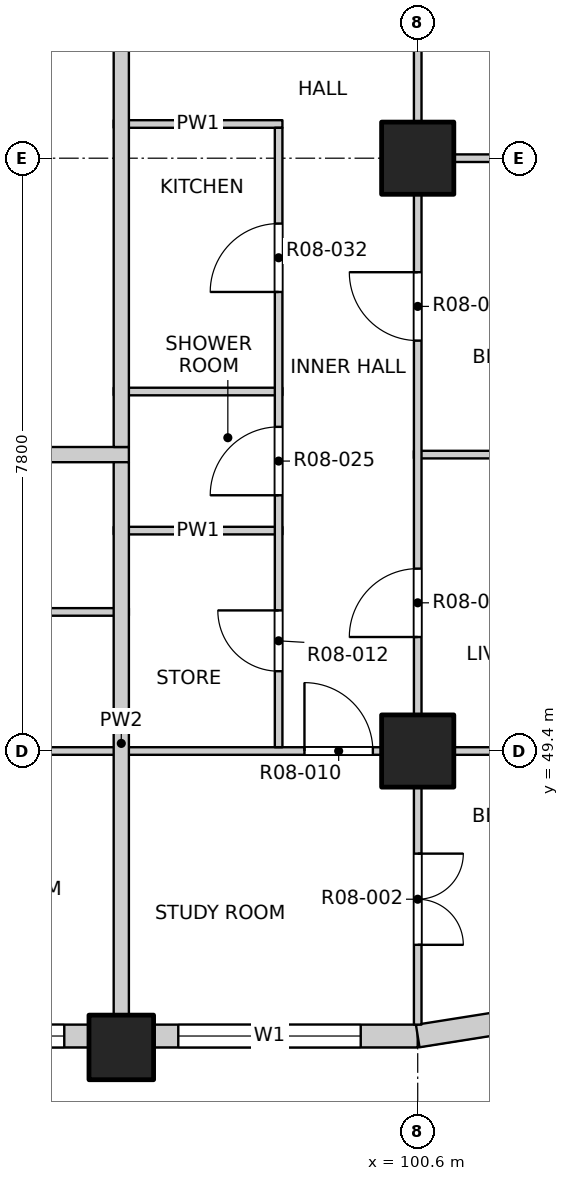
"""IFC4 building model, lengths in metres.
Left out: names, types, materials, properties, quantities, classifications, styles, units other than length and angle.
Written with IfcOpenShell. Run it as: python <this file> out.ifc"""

import sys

from ifc_helpers import new_model, si_unit, direction, frame, frame_2d, origin, origin_2d, place, context, subcontext, project, spatial, rectangle, extrude, element, fill, save


model = new_model("IFC4")
c1 = context("Model", 3, precision=1e-05, world=origin(), true_north=direction((0.0, 1.0)))
c2 = subcontext(c1, "Body", "Model", "MODEL_VIEW")
j1 = project(units=[si_unit("LENGTHUNIT", "METRE"), si_unit("PLANEANGLEUNIT", "RADIAN")], contexts=[c1])
p1 = place(None, origin())
s1 = spatial("IfcSite", under=j1, at=p1, CompositionType="ELEMENT")
p2 = place(p1, origin())
s2 = spatial("IfcBuilding", under=s1, at=p2, CompositionType="ELEMENT")
p3 = place(p2, frame((0.0, 0.0, 103.3)))
s3 = spatial("IfcBuildingStorey", under=s2, at=p3, CompositionType="ELEMENT", Elevation=103.3)
p4 = place(p3, frame((96.7, 45.5, -0.25), z_axis=(0.0, 0.0, 1.0), x_axis=(1.0, 0.0, 0.0)))
e1 = element("IfcColumn", 1, at=p4, inside=s3, PredefinedType="COLUMN", context=c2, shape_type="SweptSolid", body=[
    extrude(rectangle(XDim=0.85, YDim=0.85, at=origin_2d()), origin(), (0.0, 0.0, 1.0), 3.4),
])
for number, where, z_axis, x_axis in (
    (2, (100.6, 49.4, -0.25), (0.0, 0.0, 1.0), (1.0, 0.0, 0.0)),
    (3, (100.6, 57.2, -0.25), (0.0, 0.0, 1.0), (1.0, 0.0, 0.0)),
):
    element("IfcColumn", number, at=place(p3, frame(where, z_axis=z_axis, x_axis=x_axis)), inside=s3, PredefinedType="COLUMN", context=c2, shape_type="SweptSolid", body=[
        extrude(rectangle(XDim=0.95, YDim=0.95, at=origin_2d()), origin(), (0.0, 0.0, 1.0), 3.4),
    ])
p5 = place(p3, frame((89.325, 45.65, 0.0), z_axis=(0.0, 0.0, 1.0), x_axis=(1.0, 0.0, 0.0)))
e4 = element("IfcWall", 4, at=p5, inside=s3, PredefinedType="SOLIDWALL", context=c2, shape_type="SweptSolid", body=[
    extrude(rectangle(XDim=6.95, YDim=0.3, at=frame_2d((3.475, 0.0))), origin(), (0.0, 0.0, 1.0), 2.7),
])
p6 = place(p5, frame((0.325, 0.0, 0.9)))
e5 = element("IfcOpeningElement", 5, at=p6, cuts=e4, PredefinedType="OPENING", context=c2, shape_type="SweptSolid", body=[
    extrude(rectangle(XDim=2.4, YDim=1.8, at=frame_2d((1.2, 0.9))), frame((0.0, 0.16, 0.0), z_axis=(0.0, -1.0, 0.0), x_axis=(1.0, 0.0, 0.0)), (0.0, 0.0, 1.0), 0.32),
])
p7 = place(p5, frame((4.225, 0.0, 0.9)))
e6 = element("IfcOpeningElement", 6, at=p7, cuts=e4, PredefinedType="OPENING", context=c2, shape_type="SweptSolid", body=[
    extrude(rectangle(XDim=2.4, YDim=1.8, at=frame_2d((1.2, 0.9))), frame((0.0, 0.16, 0.0), z_axis=(0.0, -1.0, 0.0), x_axis=(1.0, 0.0, 0.0)), (0.0, 0.0, 1.0), 0.32),
])
p8 = place(p3, frame((97.125, 45.65, 0.0), z_axis=(0.0, 0.0, 1.0), x_axis=(1.0, 0.0, 0.0)))
e7 = element("IfcWall", 7, at=p8, inside=s3, PredefinedType="SOLIDWALL", context=c2, shape_type="SweptSolid", body=[
    extrude(rectangle(XDim=3.475, YDim=0.3, at=frame_2d((1.738, 0.0))), origin(), (0.0, 0.0, 1.0), 2.7),
])
p9 = place(p8, frame((0.325, 0.0, 0.9)))
e8 = element("IfcOpeningElement", 8, at=p9, cuts=e7, PredefinedType="OPENING", context=c2, shape_type="SweptSolid", body=[
    extrude(rectangle(XDim=2.4, YDim=1.8, at=frame_2d((1.2, 0.9))), frame((0.0, 0.16, 0.0), z_axis=(0.0, -1.0, 0.0), x_axis=(1.0, 0.0, 0.0)), (0.0, 0.0, 1.0), 0.32),
])
p10 = place(p3, frame((100.6, 45.65, 0.0), z_axis=(0.0, 0.0, 1.0), x_axis=(0.987678452879, 0.156496880861, 0.0)))
e9 = element("IfcWall", 9, at=p10, inside=s3, PredefinedType="SOLIDWALL", context=c2, shape_type="SweptSolid", body=[
    extrude(rectangle(XDim=1.173, YDim=0.3, at=frame_2d((0.586, 0.0))), origin(), (0.0, 0.0, 1.0), 2.7),
])
p11 = place(p3, frame((65.8, 49.4, 0.0), z_axis=(0.0, 0.0, 1.0), x_axis=(1.0, 0.0, 0.0)))
e10 = element("IfcWall", 10, at=p11, inside=s3, PredefinedType="PARTITIONING", context=c2, shape_type="SweptSolid", body=[
    extrude(rectangle(XDim=38.4, YDim=0.1, at=frame_2d((19.2, 0.0))), origin(), (0.0, 0.0, 1.0), 3.15),
])
p12 = place(p11, frame((4.19, 0.0, 0.0)))
e11 = element("IfcOpeningElement", 11, at=p12, cuts=e10, PredefinedType="OPENING", context=c2, shape_type="SweptSolid", body=[
    extrude(rectangle(XDim=0.9, YDim=2.1, at=frame_2d((0.45, 1.05))), frame((0.0, 0.06, 0.0), z_axis=(0.0, -1.0, 0.0), x_axis=(1.0, 0.0, 0.0)), (0.0, 0.0, 1.0), 0.12),
])
p13 = place(p11, frame((9.0, 0.0, 0.0)))
e12 = element("IfcOpeningElement", 12, at=p13, cuts=e10, PredefinedType="OPENING", context=c2, shape_type="SweptSolid", body=[
    extrude(rectangle(XDim=0.9, YDim=2.1, at=frame_2d((0.45, 1.05))), frame((0.0, 0.06, 0.0), z_axis=(0.0, -1.0, 0.0), x_axis=(1.0, 0.0, 0.0)), (0.0, 0.0, 1.0), 0.12),
])
p14 = place(p11, frame((12.9, 0.0, 0.0)))
e13 = element("IfcOpeningElement", 13, at=p14, cuts=e10, PredefinedType="OPENING", context=c2, shape_type="SweptSolid", body=[
    extrude(rectangle(XDim=0.9, YDim=2.1, at=frame_2d((0.45, 1.05))), frame((0.0, 0.06, 0.0), z_axis=(0.0, -1.0, 0.0), x_axis=(1.0, 0.0, 0.0)), (0.0, 0.0, 1.0), 0.12),
])
p15 = place(p11, frame((16.8, 0.0, 0.0)))
e14 = element("IfcOpeningElement", 14, at=p15, cuts=e10, PredefinedType="OPENING", context=c2, shape_type="SweptSolid", body=[
    extrude(rectangle(XDim=0.9, YDim=2.1, at=frame_2d((0.45, 1.05))), frame((0.0, 0.06, 0.0), z_axis=(0.0, -1.0, 0.0), x_axis=(1.0, 0.0, 0.0)), (0.0, 0.0, 1.0), 0.12),
])
p16 = place(p11, frame((20.7, 0.0, 0.0)))
e15 = element("IfcOpeningElement", 15, at=p16, cuts=e10, PredefinedType="OPENING", context=c2, shape_type="SweptSolid", body=[
    extrude(rectangle(XDim=0.9, YDim=2.1, at=frame_2d((0.45, 1.05))), frame((0.0, 0.06, 0.0), z_axis=(0.0, -1.0, 0.0), x_axis=(1.0, 0.0, 0.0)), (0.0, 0.0, 1.0), 0.12),
])
p17 = place(p11, frame((24.6, 0.0, 0.0)))
e16 = element("IfcOpeningElement", 16, at=p17, cuts=e10, PredefinedType="OPENING", context=c2, shape_type="SweptSolid", body=[
    extrude(rectangle(XDim=0.9, YDim=2.1, at=frame_2d((0.45, 1.05))), frame((0.0, 0.06, 0.0), z_axis=(0.0, -1.0, 0.0), x_axis=(1.0, 0.0, 0.0)), (0.0, 0.0, 1.0), 0.12),
])
p18 = place(p11, frame((28.5, 0.0, 0.0)))
e17 = element("IfcOpeningElement", 17, at=p18, cuts=e10, PredefinedType="OPENING", context=c2, shape_type="SweptSolid", body=[
    extrude(rectangle(XDim=0.9, YDim=2.1, at=frame_2d((0.45, 1.05))), frame((0.0, 0.06, 0.0), z_axis=(0.0, -1.0, 0.0), x_axis=(1.0, 0.0, 0.0)), (0.0, 0.0, 1.0), 0.12),
])
p19 = place(p11, frame((33.31, 0.0, 0.0)))
e18 = element("IfcOpeningElement", 18, at=p19, cuts=e10, PredefinedType="OPENING", context=c2, shape_type="SweptSolid", body=[
    extrude(rectangle(XDim=0.9, YDim=2.1, at=frame_2d((0.45, 1.05))), frame((0.0, 0.06, 0.0), z_axis=(0.0, -1.0, 0.0), x_axis=(1.0, 0.0, 0.0)), (0.0, 0.0, 1.0), 0.12),
])
p20 = place(p3, frame((91.05, 51.23, 0.0), z_axis=(0.0, 0.0, 1.0), x_axis=(1.0, 0.0, 0.0)))
e19 = element("IfcWall", 19, at=p20, inside=s3, PredefinedType="PARTITIONING", context=c2, shape_type="SweptSolid", body=[
    extrude(rectangle(XDim=5.75, YDim=0.1, at=frame_2d((2.875, 0.0))), origin(), (0.0, 0.0, 1.0), 3.15),
])
p21 = place(p20, frame((0.865, 0.0, 0.0)))
e20 = element("IfcOpeningElement", 20, at=p21, cuts=e19, PredefinedType="OPENING", context=c2, shape_type="SweptSolid", body=[
    extrude(rectangle(XDim=0.9, YDim=2.1, at=frame_2d((0.45, 1.05))), frame((0.0, 0.06, 0.0), z_axis=(0.0, -1.0, 0.0), x_axis=(1.0, 0.0, 0.0)), (0.0, 0.0, 1.0), 0.12),
])
p22 = place(p20, frame((3.665, 0.0, 0.0)))
e21 = element("IfcOpeningElement", 21, at=p22, cuts=e19, PredefinedType="OPENING", context=c2, shape_type="SweptSolid", body=[
    extrude(rectangle(XDim=0.9, YDim=2.1, at=frame_2d((0.45, 1.05))), frame((0.0, 0.06, 0.0), z_axis=(0.0, -1.0, 0.0), x_axis=(1.0, 0.0, 0.0)), (0.0, 0.0, 1.0), 0.12),
])
p23 = place(p3, frame((96.6, 52.3, 0.0), z_axis=(0.0, 0.0, 1.0), x_axis=(1.0, 0.0, 0.0)))
e22 = element("IfcWall", 22, at=p23, inside=s3, PredefinedType="PARTITIONING", context=c2, shape_type="SweptSolid", body=[
    extrude(rectangle(XDim=2.22, YDim=0.1, at=frame_2d((1.11, 0.0))), origin(), (0.0, 0.0, 1.0), 3.15),
])
p24 = place(p3, frame((73.2, 53.3, 0.0), z_axis=(0.0, 0.0, 1.0), x_axis=(1.0, 0.0, 0.0)))
e23 = element("IfcWall", 23, at=p24, inside=s3, PredefinedType="PARTITIONING", context=c2, shape_type="SweptSolid", body=[
    extrude(rectangle(XDim=23.6, YDim=0.2, at=frame_2d((11.8, 0.0))), origin(), (0.0, 0.0, 1.0), 3.15),
])
p25 = place(p24, frame((5.975, 0.0, 0.0)))
e24 = element("IfcOpeningElement", 24, at=p25, cuts=e23, PredefinedType="OPENING", context=c2, shape_type="SweptSolid", body=[
    extrude(rectangle(XDim=1.0, YDim=2.1, at=frame_2d((0.5, 1.05))), frame((0.0, 0.11, 0.0), z_axis=(0.0, -1.0, 0.0), x_axis=(1.0, 0.0, 0.0)), (0.0, 0.0, 1.0), 0.22),
])
p26 = place(p24, frame((18.075, 0.0, 0.0)))
e25 = element("IfcOpeningElement", 25, at=p26, cuts=e23, PredefinedType="OPENING", context=c2, shape_type="SweptSolid", body=[
    extrude(rectangle(XDim=1.0, YDim=2.1, at=frame_2d((0.5, 1.05))), frame((0.0, 0.11, 0.0), z_axis=(0.0, -1.0, 0.0), x_axis=(1.0, 0.0, 0.0)), (0.0, 0.0, 1.0), 0.22),
])
p27 = place(p3, frame((100.55, 53.3, 0.0), z_axis=(0.0, 0.0, 1.0), x_axis=(1.0, 0.0, 0.0)))
e26 = element("IfcWall", 26, at=p27, inside=s3, PredefinedType="PARTITIONING", context=c2, shape_type="SweptSolid", body=[
    extrude(rectangle(XDim=3.65, YDim=0.1, at=frame_2d((1.825, 0.0))), origin(), (0.0, 0.0, 1.0), 3.15),
])
p28 = place(p3, frame((96.6, 54.13, 0.0), z_axis=(0.0, 0.0, 1.0), x_axis=(1.0, 0.0, 0.0)))
e27 = element("IfcWall", 27, at=p28, inside=s3, PredefinedType="PARTITIONING", context=c2, shape_type="SweptSolid", body=[
    extrude(rectangle(XDim=2.22, YDim=0.1, at=frame_2d((1.11, 0.0))), origin(), (0.0, 0.0, 1.0), 3.15),
])
p29 = place(p3, frame((100.55, 57.2, 0.0), z_axis=(0.0, 0.0, 1.0), x_axis=(1.0, 0.0, 0.0)))
e28 = element("IfcWall", 28, at=p29, inside=s3, PredefinedType="PARTITIONING", context=c2, shape_type="SweptSolid", body=[
    extrude(rectangle(XDim=3.65, YDim=0.1, at=frame_2d((1.825, 0.0))), origin(), (0.0, 0.0, 1.0), 3.15),
])
p30 = place(p3, frame((96.6, 57.65, 0.0), z_axis=(0.0, 0.0, 1.0), x_axis=(1.0, 0.0, 0.0)))
e29 = element("IfcWall", 29, at=p30, inside=s3, PredefinedType="PARTITIONING", context=c2, shape_type="SweptSolid", body=[
    extrude(rectangle(XDim=2.22, YDim=0.1, at=frame_2d((1.11, 0.0))), origin(), (0.0, 0.0, 1.0), 3.15),
])
p31 = place(p3, frame((96.7, 45.8, 0.0), z_axis=(0.0, 0.0, 1.0), x_axis=(0.0, 1.0, 0.0)))
e30 = element("IfcWall", 30, at=p31, inside=s3, PredefinedType="PARTITIONING", context=c2, shape_type="SweptSolid", body=[
    extrude(rectangle(XDim=7.4, YDim=0.2, at=frame_2d((3.7, 0.0))), origin(), (0.0, 0.0, 1.0), 3.15),
])
p32 = place(p3, frame((96.7, 53.4, 0.0), z_axis=(0.0, 0.0, 1.0), x_axis=(0.0, 1.0, 0.0)))
e31 = element("IfcWall", 31, at=p32, inside=s3, PredefinedType="PARTITIONING", context=c2, shape_type="SweptSolid", body=[
    extrude(rectangle(XDim=30.8, YDim=0.2, at=frame_2d((15.4, 0.0))), origin(), (0.0, 0.0, 1.0), 3.15),
])
p33 = place(p32, frame((5.525, 0.0, 0.0)))
e32 = element("IfcOpeningElement", 32, at=p33, cuts=e31, PredefinedType="OPENING", context=c2, shape_type="SweptSolid", body=[
    extrude(rectangle(XDim=1.0, YDim=2.1, at=frame_2d((0.5, 1.05))), frame((0.0, 0.11, 0.0), z_axis=(0.0, -1.0, 0.0), x_axis=(1.0, 0.0, 0.0)), (0.0, 0.0, 1.0), 0.22),
])
p34 = place(p32, frame((13.775, 0.0, 0.0)))
e33 = element("IfcOpeningElement", 33, at=p34, cuts=e31, PredefinedType="OPENING", context=c2, shape_type="SweptSolid", body=[
    extrude(rectangle(XDim=1.0, YDim=2.1, at=frame_2d((0.5, 1.05))), frame((0.0, 0.11, 0.0), z_axis=(0.0, -1.0, 0.0), x_axis=(1.0, 0.0, 0.0)), (0.0, 0.0, 1.0), 0.22),
])
p35 = place(p32, frame((22.125, 0.0, 0.0)))
e34 = element("IfcOpeningElement", 34, at=p35, cuts=e31, PredefinedType="OPENING", context=c2, shape_type="SweptSolid", body=[
    extrude(rectangle(XDim=1.0, YDim=2.1, at=frame_2d((0.5, 1.05))), frame((0.0, 0.11, 0.0), z_axis=(0.0, -1.0, 0.0), x_axis=(1.0, 0.0, 0.0)), (0.0, 0.0, 1.0), 0.22),
])
p36 = place(p3, frame((98.77, 49.45, 0.0), z_axis=(0.0, 0.0, 1.0), x_axis=(0.0, 1.0, 0.0)))
e35 = element("IfcWall", 35, at=p36, inside=s3, PredefinedType="PARTITIONING", context=c2, shape_type="SweptSolid", body=[
    extrude(rectangle(XDim=8.15, YDim=0.1, at=frame_2d((4.075, 0.0))), origin(), (0.0, 0.0, 1.0), 3.15),
])
p37 = place(p36, frame((1.0, 0.0, 0.0)))
e36 = element("IfcOpeningElement", 36, at=p37, cuts=e35, PredefinedType="OPENING", context=c2, shape_type="SweptSolid", body=[
    extrude(rectangle(XDim=0.8, YDim=2.1, at=frame_2d((0.4, 1.05))), frame((0.0, 0.06, 0.0), z_axis=(0.0, -1.0, 0.0), x_axis=(1.0, 0.0, 0.0)), (0.0, 0.0, 1.0), 0.12),
])
p38 = place(p36, frame((3.315, 0.0, 0.0)))
e37 = element("IfcOpeningElement", 37, at=p38, cuts=e35, PredefinedType="OPENING", context=c2, shape_type="SweptSolid", body=[
    extrude(rectangle(XDim=0.9, YDim=2.1, at=frame_2d((0.45, 1.05))), frame((0.0, 0.06, 0.0), z_axis=(0.0, -1.0, 0.0), x_axis=(1.0, 0.0, 0.0)), (0.0, 0.0, 1.0), 0.12),
])
p39 = place(p36, frame((5.99, 0.0, 0.0)))
e38 = element("IfcOpeningElement", 38, at=p39, cuts=e35, PredefinedType="OPENING", context=c2, shape_type="SweptSolid", body=[
    extrude(rectangle(XDim=0.9, YDim=2.1, at=frame_2d((0.45, 1.05))), frame((0.0, 0.06, 0.0), z_axis=(0.0, -1.0, 0.0), x_axis=(1.0, 0.0, 0.0)), (0.0, 0.0, 1.0), 0.12),
])
p40 = place(p3, frame((100.6, 45.8, 0.0), z_axis=(0.0, 0.0, 1.0), x_axis=(0.0, 1.0, 0.0)))
e39 = element("IfcWall", 39, at=p40, inside=s3, PredefinedType="PARTITIONING", context=c2, shape_type="SweptSolid", body=[
    extrude(rectangle(XDim=38.4, YDim=0.1, at=frame_2d((19.2, 0.0))), origin(), (0.0, 0.0, 1.0), 3.15),
])
p41 = place(p40, frame((1.05, 0.0, 0.0)))
e40 = element("IfcOpeningElement", 40, at=p41, cuts=e39, PredefinedType="OPENING", context=c2, shape_type="SweptSolid", body=[
    extrude(rectangle(XDim=1.2, YDim=2.1, at=frame_2d((0.6, 1.05))), frame((0.0, 0.06, 0.0), z_axis=(0.0, -1.0, 0.0), x_axis=(1.0, 0.0, 0.0)), (0.0, 0.0, 1.0), 0.12),
])
p42 = place(p40, frame((5.1, 0.0, 0.0)))
e41 = element("IfcOpeningElement", 41, at=p42, cuts=e39, PredefinedType="OPENING", context=c2, shape_type="SweptSolid", body=[
    extrude(rectangle(XDim=0.9, YDim=2.1, at=frame_2d((0.45, 1.05))), frame((0.0, 0.06, 0.0), z_axis=(0.0, -1.0, 0.0), x_axis=(1.0, 0.0, 0.0)), (0.0, 0.0, 1.0), 0.12),
])
p43 = place(p40, frame((9.0, 0.0, 0.0)))
e42 = element("IfcOpeningElement", 42, at=p43, cuts=e39, PredefinedType="OPENING", context=c2, shape_type="SweptSolid", body=[
    extrude(rectangle(XDim=0.9, YDim=2.1, at=frame_2d((0.45, 1.05))), frame((0.0, 0.06, 0.0), z_axis=(0.0, -1.0, 0.0), x_axis=(1.0, 0.0, 0.0)), (0.0, 0.0, 1.0), 0.12),
])
p44 = place(p40, frame((12.9, 0.0, 0.0)))
e43 = element("IfcOpeningElement", 43, at=p44, cuts=e39, PredefinedType="OPENING", context=c2, shape_type="SweptSolid", body=[
    extrude(rectangle(XDim=0.9, YDim=2.1, at=frame_2d((0.45, 1.05))), frame((0.0, 0.06, 0.0), z_axis=(0.0, -1.0, 0.0), x_axis=(1.0, 0.0, 0.0)), (0.0, 0.0, 1.0), 0.12),
])
p45 = place(p40, frame((16.8, 0.0, 0.0)))
e44 = element("IfcOpeningElement", 44, at=p45, cuts=e39, PredefinedType="OPENING", context=c2, shape_type="SweptSolid", body=[
    extrude(rectangle(XDim=0.9, YDim=2.1, at=frame_2d((0.45, 1.05))), frame((0.0, 0.06, 0.0), z_axis=(0.0, -1.0, 0.0), x_axis=(1.0, 0.0, 0.0)), (0.0, 0.0, 1.0), 0.12),
])
p46 = place(p40, frame((20.7, 0.0, 0.0)))
e45 = element("IfcOpeningElement", 45, at=p46, cuts=e39, PredefinedType="OPENING", context=c2, shape_type="SweptSolid", body=[
    extrude(rectangle(XDim=0.9, YDim=2.1, at=frame_2d((0.45, 1.05))), frame((0.0, 0.06, 0.0), z_axis=(0.0, -1.0, 0.0), x_axis=(1.0, 0.0, 0.0)), (0.0, 0.0, 1.0), 0.12),
])
p47 = place(p40, frame((24.6, 0.0, 0.0)))
e46 = element("IfcOpeningElement", 46, at=p47, cuts=e39, PredefinedType="OPENING", context=c2, shape_type="SweptSolid", body=[
    extrude(rectangle(XDim=0.9, YDim=2.1, at=frame_2d((0.45, 1.05))), frame((0.0, 0.06, 0.0), z_axis=(0.0, -1.0, 0.0), x_axis=(1.0, 0.0, 0.0)), (0.0, 0.0, 1.0), 0.12),
])
p48 = place(p40, frame((28.5, 0.0, 0.0)))
e47 = element("IfcOpeningElement", 47, at=p48, cuts=e39, PredefinedType="OPENING", context=c2, shape_type="SweptSolid", body=[
    extrude(rectangle(XDim=0.9, YDim=2.1, at=frame_2d((0.45, 1.05))), frame((0.0, 0.06, 0.0), z_axis=(0.0, -1.0, 0.0), x_axis=(1.0, 0.0, 0.0)), (0.0, 0.0, 1.0), 0.12),
])
p49 = place(p40, frame((32.4, 0.0, 0.0)))
e48 = element("IfcOpeningElement", 48, at=p49, cuts=e39, PredefinedType="OPENING", context=c2, shape_type="SweptSolid", body=[
    extrude(rectangle(XDim=0.9, YDim=2.1, at=frame_2d((0.45, 1.05))), frame((0.0, 0.06, 0.0), z_axis=(0.0, -1.0, 0.0), x_axis=(1.0, 0.0, 0.0)), (0.0, 0.0, 1.0), 0.12),
])
p50 = place(p40, frame((36.15, 0.0, 0.0)))
e49 = element("IfcOpeningElement", 49, at=p50, cuts=e39, PredefinedType="OPENING", context=c2, shape_type="SweptSolid", body=[
    extrude(rectangle(XDim=1.2, YDim=2.1, at=frame_2d((0.6, 1.05))), frame((0.0, 0.06, 0.0), z_axis=(0.0, -1.0, 0.0), x_axis=(1.0, 0.0, 0.0)), (0.0, 0.0, 1.0), 0.12),
])
p51 = place(p7, origin())
e50 = element("IfcWindow", 50, at=p51, inside=s3, PartitioningType="DOUBLE_PANEL_VERTICAL", PredefinedType="WINDOW", context=c2, shape_type="SweptSolid", body=[
    extrude(rectangle(XDim=2.4, YDim=1.8, at=frame_2d((1.2, 0.9))), frame((0.0, 0.03, 0.0), z_axis=(0.0, -1.0, 0.0), x_axis=(1.0, 0.0, 0.0)), (0.0, 0.0, 1.0), 0.06),
])
fill(e6, e50)
p52 = place(p9, origin())
e51 = element("IfcWindow", 51, at=p52, inside=s3, PartitioningType="DOUBLE_PANEL_VERTICAL", PredefinedType="WINDOW", context=c2, shape_type="SweptSolid", body=[
    extrude(rectangle(XDim=2.4, YDim=1.8, at=frame_2d((1.2, 0.9))), frame((0.0, 0.03, 0.0), z_axis=(0.0, -1.0, 0.0), x_axis=(1.0, 0.0, 0.0)), (0.0, 0.0, 1.0), 0.06),
])
fill(e8, e51)
p53 = place(p41, origin())
e52 = element("IfcDoor", 52, at=p53, inside=s3, OperationType="DOUBLE_DOOR_SINGLE_SWING", PredefinedType="DOOR", context=c2, shape_type="SweptSolid", body=[
    extrude(rectangle(XDim=1.2, YDim=2.1, at=frame_2d((0.6, 1.05))), frame((0.0, 0.025, 0.0), z_axis=(0.0, -1.0, 0.0), x_axis=(1.0, 0.0, 0.0)), (0.0, 0.0, 1.0), 0.05),
])
fill(e40, e52)
p54 = place(p19, origin())
e53 = element("IfcDoor", 53, at=p54, inside=s3, OperationType="SINGLE_SWING_LEFT", PredefinedType="DOOR", context=c2, shape_type="SweptSolid", body=[
    extrude(rectangle(XDim=0.9, YDim=2.1, at=frame_2d((0.45, 1.05))), frame((0.0, 0.025, 0.0), z_axis=(0.0, -1.0, 0.0), x_axis=(1.0, 0.0, 0.0)), (0.0, 0.0, 1.0), 0.05),
])
fill(e18, e53)
p55 = place(p37, origin())
e54 = element("IfcDoor", 54, at=p55, inside=s3, OperationType="SINGLE_SWING_RIGHT", PredefinedType="DOOR", context=c2, shape_type="SweptSolid", body=[
    extrude(rectangle(XDim=0.8, YDim=2.1, at=frame_2d((0.4, 1.05))), frame((0.0, 0.025, 0.0), z_axis=(0.0, -1.0, 0.0), x_axis=(1.0, 0.0, 0.0)), (0.0, 0.0, 1.0), 0.05),
])
fill(e36, e54)
p56 = place(p42, origin())
e55 = element("IfcDoor", 55, at=p56, inside=s3, OperationType="SINGLE_SWING_LEFT", PredefinedType="DOOR", context=c2, shape_type="SweptSolid", body=[
    extrude(rectangle(XDim=0.9, YDim=2.1, at=frame_2d((0.45, 1.05))), frame((0.0, 0.025, 0.0), z_axis=(0.0, -1.0, 0.0), x_axis=(1.0, 0.0, 0.0)), (0.0, 0.0, 1.0), 0.05),
])
fill(e41, e55)
p57 = place(p38, origin())
e56 = element("IfcDoor", 56, at=p57, inside=s3, OperationType="SINGLE_SWING_LEFT", PredefinedType="DOOR", context=c2, shape_type="SweptSolid", body=[
    extrude(rectangle(XDim=0.9, YDim=2.1, at=frame_2d((0.45, 1.05))), frame((0.0, 0.025, 0.0), z_axis=(0.0, -1.0, 0.0), x_axis=(1.0, 0.0, 0.0)), (0.0, 0.0, 1.0), 0.05),
])
fill(e37, e56)
p58 = place(p43, origin())
e57 = element("IfcDoor", 57, at=p58, inside=s3, OperationType="SINGLE_SWING_RIGHT", PredefinedType="DOOR", context=c2, shape_type="SweptSolid", body=[
    extrude(rectangle(XDim=0.9, YDim=2.1, at=frame_2d((0.45, 1.05))), frame((0.0, 0.025, 0.0), z_axis=(0.0, -1.0, 0.0), x_axis=(1.0, 0.0, 0.0)), (0.0, 0.0, 1.0), 0.05),
])
fill(e42, e57)
p59 = place(p39, origin())
e58 = element("IfcDoor", 58, at=p59, inside=s3, OperationType="SINGLE_SWING_LEFT", PredefinedType="DOOR", context=c2, shape_type="SweptSolid", body=[
    extrude(rectangle(XDim=0.9, YDim=2.1, at=frame_2d((0.45, 1.05))), frame((0.0, 0.025, 0.0), z_axis=(0.0, -1.0, 0.0), x_axis=(1.0, 0.0, 0.0)), (0.0, 0.0, 1.0), 0.05),
])
fill(e38, e58)
save(model, sys.argv[1])
